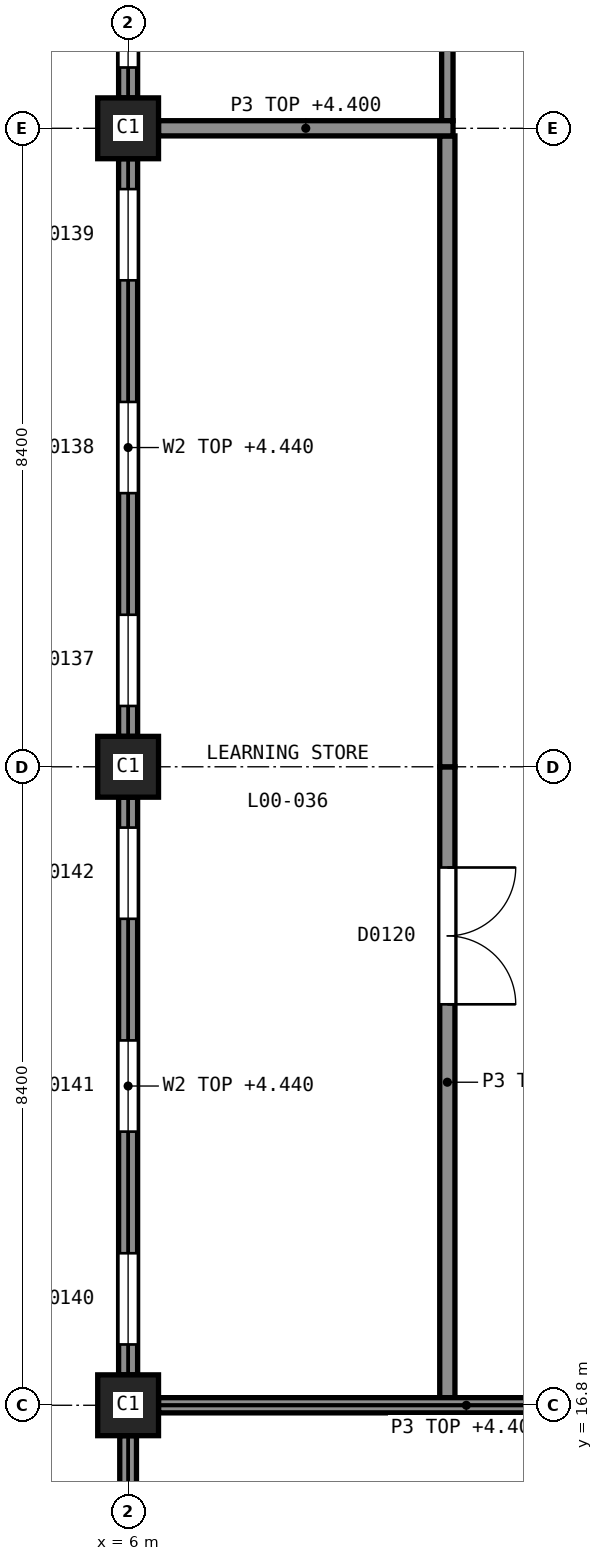
"""IFC4 building model, lengths in metres.
Left out: names, types, materials, properties, quantities, classifications, styles, units other than length and angle.
Written with IfcOpenShell. Run it as: python <this file> out.ifc"""

import sys

from ifc_helpers import new_model, si_unit, direction, frame, frame_2d, origin, origin_2d, place, context, subcontext, project, spatial, rectangle, extrude, element, fill, save


model = new_model("IFC4")
c1 = context("Model", 3, precision=1e-05, world=origin(), true_north=direction((0.0, 1.0)))
c2 = subcontext(c1, "Body", "Model", "MODEL_VIEW")
j1 = project(units=[si_unit("LENGTHUNIT", "METRE"), si_unit("PLANEANGLEUNIT", "RADIAN")], contexts=[c1])
p1 = place(None, origin())
s1 = spatial("IfcSite", under=j1, at=p1, CompositionType="ELEMENT")
p2 = place(p1, origin())
s2 = spatial("IfcBuilding", under=s1, at=p2, CompositionType="ELEMENT")
p3 = place(p2, origin())
s3 = spatial("IfcBuildingStorey", under=s2, at=p3, CompositionType="ELEMENT", Elevation=0.0)
for number, where, z_axis, x_axis in (
    (1, (6.0, 16.8, -0.3), (0.0, 0.0, 1.0), (1.0, 0.0, 0.0)),
    (2, (6.0, 25.2, -0.3), (0.0, 0.0, 1.0), (1.0, 0.0, 0.0)),
    (3, (6.0, 33.6, -0.3), (0.0, 0.0, 1.0), (1.0, 0.0, 0.0)),
):
    element("IfcColumn", number, at=place(p3, frame(where, z_axis=z_axis, x_axis=x_axis)), inside=s3, PredefinedType="COLUMN", context=c2, shape_type="SweptSolid", body=[
        extrude(rectangle(XDim=0.8, YDim=0.8, at=origin_2d()), origin(), (0.0, 0.0, 1.0), 5.8),
    ])
p4 = place(p3, frame((6.0, 34.0, 0.0), z_axis=(0.0, 0.0, 1.0), x_axis=(0.0, 1.0, 0.0)))
e4 = element("IfcWall", 4, at=p4, inside=s3, PredefinedType="SOLIDWALL", context=c2, shape_type="SweptSolid", body=[
    extrude(rectangle(XDim=7.6, YDim=0.25, at=frame_2d((3.8, 0.0))), origin(), (0.0, 0.0, 1.0), 4.44),
])
p5 = place(p4, frame((0.4, 0.0, 0.9)))
e5 = element("IfcOpeningElement", 5, at=p5, cuts=e4, PredefinedType="OPENING", context=c2, shape_type="SweptSolid", body=[
    extrude(rectangle(XDim=1.2, YDim=2.1, at=frame_2d((0.6, 1.05))), frame((0.0, 0.135, 0.0), z_axis=(0.0, -1.0, 0.0), x_axis=(1.0, 0.0, 0.0)), (0.0, 0.0, 1.0), 0.27),
])
p6 = place(p4, frame((3.2, 0.0, 0.9)))
e6 = element("IfcOpeningElement", 6, at=p6, cuts=e4, PredefinedType="OPENING", context=c2, shape_type="SweptSolid", body=[
    extrude(rectangle(XDim=1.2, YDim=2.1, at=frame_2d((0.6, 1.05))), frame((0.0, 0.135, 0.0), z_axis=(0.0, -1.0, 0.0), x_axis=(1.0, 0.0, 0.0)), (0.0, 0.0, 1.0), 0.27),
])
p7 = place(p4, frame((6.0, 0.0, 0.9)))
e7 = element("IfcOpeningElement", 7, at=p7, cuts=e4, PredefinedType="OPENING", context=c2, shape_type="SweptSolid", body=[
    extrude(rectangle(XDim=1.2, YDim=2.1, at=frame_2d((0.6, 1.05))), frame((0.0, 0.135, 0.0), z_axis=(0.0, -1.0, 0.0), x_axis=(1.0, 0.0, 0.0)), (0.0, 0.0, 1.0), 0.27),
])
p8 = place(p3, frame((6.0, 25.6, 0.0), z_axis=(0.0, 0.0, 1.0), x_axis=(0.0, 1.0, 0.0)))
e8 = element("IfcWall", 8, at=p8, inside=s3, PredefinedType="SOLIDWALL", context=c2, shape_type="SweptSolid", body=[
    extrude(rectangle(XDim=7.6, YDim=0.25, at=frame_2d((3.8, 0.0))), origin(), (0.0, 0.0, 1.0), 4.44),
])
p9 = place(p8, frame((0.4, 0.0, 0.9)))
e9 = element("IfcOpeningElement", 9, at=p9, cuts=e8, PredefinedType="OPENING", context=c2, shape_type="SweptSolid", body=[
    extrude(rectangle(XDim=1.2, YDim=2.1, at=frame_2d((0.6, 1.05))), frame((0.0, 0.135, 0.0), z_axis=(0.0, -1.0, 0.0), x_axis=(1.0, 0.0, 0.0)), (0.0, 0.0, 1.0), 0.27),
])
p10 = place(p8, frame((3.2, 0.0, 0.9)))
e10 = element("IfcOpeningElement", 10, at=p10, cuts=e8, PredefinedType="OPENING", context=c2, shape_type="SweptSolid", body=[
    extrude(rectangle(XDim=1.2, YDim=2.1, at=frame_2d((0.6, 1.05))), frame((0.0, 0.135, 0.0), z_axis=(0.0, -1.0, 0.0), x_axis=(1.0, 0.0, 0.0)), (0.0, 0.0, 1.0), 0.27),
])
p11 = place(p8, frame((6.0, 0.0, 0.9)))
e11 = element("IfcOpeningElement", 11, at=p11, cuts=e8, PredefinedType="OPENING", context=c2, shape_type="SweptSolid", body=[
    extrude(rectangle(XDim=1.2, YDim=2.1, at=frame_2d((0.6, 1.05))), frame((0.0, 0.135, 0.0), z_axis=(0.0, -1.0, 0.0), x_axis=(1.0, 0.0, 0.0)), (0.0, 0.0, 1.0), 0.27),
])
p12 = place(p3, frame((6.0, 17.2, 0.0), z_axis=(0.0, 0.0, 1.0), x_axis=(0.0, 1.0, 0.0)))
e12 = element("IfcWall", 12, at=p12, inside=s3, PredefinedType="SOLIDWALL", context=c2, shape_type="SweptSolid", body=[
    extrude(rectangle(XDim=7.6, YDim=0.25, at=frame_2d((3.8, 0.0))), origin(), (0.0, 0.0, 1.0), 4.44),
])
p13 = place(p12, frame((0.4, 0.0, 0.9)))
e13 = element("IfcOpeningElement", 13, at=p13, cuts=e12, PredefinedType="OPENING", context=c2, shape_type="SweptSolid", body=[
    extrude(rectangle(XDim=1.2, YDim=2.1, at=frame_2d((0.6, 1.05))), frame((0.0, 0.135, 0.0), z_axis=(0.0, -1.0, 0.0), x_axis=(1.0, 0.0, 0.0)), (0.0, 0.0, 1.0), 0.27),
])
p14 = place(p12, frame((3.2, 0.0, 0.9)))
e14 = element("IfcOpeningElement", 14, at=p14, cuts=e12, PredefinedType="OPENING", context=c2, shape_type="SweptSolid", body=[
    extrude(rectangle(XDim=1.2, YDim=2.1, at=frame_2d((0.6, 1.05))), frame((0.0, 0.135, 0.0), z_axis=(0.0, -1.0, 0.0), x_axis=(1.0, 0.0, 0.0)), (0.0, 0.0, 1.0), 0.27),
])
p15 = place(p12, frame((6.0, 0.0, 0.9)))
e15 = element("IfcOpeningElement", 15, at=p15, cuts=e12, PredefinedType="OPENING", context=c2, shape_type="SweptSolid", body=[
    extrude(rectangle(XDim=1.2, YDim=2.1, at=frame_2d((0.6, 1.05))), frame((0.0, 0.135, 0.0), z_axis=(0.0, -1.0, 0.0), x_axis=(1.0, 0.0, 0.0)), (0.0, 0.0, 1.0), 0.27),
])
p16 = place(p3, frame((6.0, 8.4, 0.0), z_axis=(0.0, 0.0, 1.0), x_axis=(0.0, 1.0, 0.0)))
e16 = element("IfcWall", 16, at=p16, inside=s3, PredefinedType="SOLIDWALL", context=c2, shape_type="SweptSolid", body=[
    extrude(rectangle(XDim=8.0, YDim=0.22, at=frame_2d((4.0, 0.0))), origin(), (0.0, 0.0, 1.0), 4.44),
])
p17 = place(p16, frame((2.85, 0.0, 2.1)))
e17 = element("IfcOpeningElement", 17, at=p17, cuts=e16, PredefinedType="OPENING", context=c2, shape_type="SweptSolid", body=[
    extrude(rectangle(XDim=1.2, YDim=0.6, at=frame_2d((0.6, 0.3))), frame((0.0, 0.12, 0.0), z_axis=(0.0, -1.0, 0.0), x_axis=(1.0, 0.0, 0.0)), (0.0, 0.0, 1.0), 0.24),
])
p18 = place(p3, frame((10.2, 33.7, 0.0), z_axis=(0.0, 0.0, 1.0), x_axis=(0.0, 1.0, 0.0)))
e18 = element("IfcWall", 18, at=p18, inside=s3, PredefinedType="PARTITIONING", context=c2, shape_type="SweptSolid", body=[
    extrude(rectangle(XDim=8.3, YDim=0.15, at=frame_2d((4.15, 0.0))), origin(), (0.0, 0.0, 1.0), 4.4),
])
p19 = place(p18, frame((5.625, 0.0, 0.0)))
e19 = element("IfcOpeningElement", 19, at=p19, cuts=e18, PredefinedType="OPENING", context=c2, shape_type="SweptSolid", body=[
    extrude(rectangle(XDim=0.9, YDim=2.1, at=frame_2d((0.45, 1.05))), frame((0.0, 0.085, 0.0), z_axis=(0.0, -1.0, 0.0), x_axis=(1.0, 0.0, 0.0)), (0.0, 0.0, 1.0), 0.17),
])
p20 = place(p3, frame((10.2, 16.9, 0.0), z_axis=(0.0, 0.0, 1.0), x_axis=(0.0, 1.0, 0.0)))
e20 = element("IfcWall", 20, at=p20, inside=s3, PredefinedType="PARTITIONING", context=c2, shape_type="SweptSolid", body=[
    extrude(rectangle(XDim=8.3, YDim=0.2, at=frame_2d((4.15, 0.0))), origin(), (0.0, 0.0, 1.0), 4.4),
])
p21 = place(p20, frame((5.175, 0.0, 0.0)))
e21 = element("IfcOpeningElement", 21, at=p21, cuts=e20, PredefinedType="OPENING", context=c2, shape_type="SweptSolid", body=[
    extrude(rectangle(XDim=1.8, YDim=2.1, at=frame_2d((0.9, 1.05))), frame((0.0, 0.11, 0.0), z_axis=(0.0, -1.0, 0.0), x_axis=(1.0, 0.0, 0.0)), (0.0, 0.0, 1.0), 0.22),
])
p22 = place(p3, frame((10.2, 25.2, 0.0), z_axis=(0.0, 0.0, 1.0), x_axis=(0.0, 1.0, 0.0)))
e22 = element("IfcWall", 22, at=p22, inside=s3, PredefinedType="PARTITIONING", context=c2, shape_type="SweptSolid", body=[
    extrude(rectangle(XDim=8.3, YDim=0.2, at=frame_2d((4.15, 0.0))), origin(), (0.0, 0.0, 1.0), 4.4),
])
p23 = place(p3, frame((6.4, 33.6, 0.0), z_axis=(0.0, 0.0, 1.0), x_axis=(1.0, 0.0, 0.0)))
e23 = element("IfcWall", 23, at=p23, inside=s3, PredefinedType="PARTITIONING", context=c2, shape_type="SweptSolid", body=[
    extrude(rectangle(XDim=3.875, YDim=0.2, at=frame_2d((1.938, 0.0))), origin(), (0.0, 0.0, 1.0), 4.4),
])
p24 = place(p3, frame((6.4, 16.8, 0.0), z_axis=(0.0, 0.0, 1.0), x_axis=(1.0, 0.0, 0.0)))
e24 = element("IfcWall", 24, at=p24, inside=s3, PredefinedType="PARTITIONING", context=c2, shape_type="SweptSolid", body=[
    extrude(rectangle(XDim=8.1, YDim=0.2, at=frame_2d((4.05, 0.0))), origin(), (0.0, 0.0, 1.0), 4.4),
])
p25 = place(p24, frame((5.4, 0.0, 0.0)))
e25 = element("IfcOpeningElement", 25, at=p25, cuts=e24, PredefinedType="OPENING", context=c2, shape_type="SweptSolid", body=[
    extrude(rectangle(XDim=1.0, YDim=2.1, at=frame_2d((0.5, 1.05))), frame((0.0, 0.11, 0.0), z_axis=(0.0, -1.0, 0.0), x_axis=(1.0, 0.0, 0.0)), (0.0, 0.0, 1.0), 0.22),
])
p26 = place(p5, origin())
e26 = element("IfcWindow", 26, at=p26, inside=s3, PartitioningType="SINGLE_PANEL", PredefinedType="WINDOW", context=c2, shape_type="SweptSolid", body=[
    extrude(rectangle(XDim=1.2, YDim=2.1, at=frame_2d((0.6, 1.05))), frame((0.0, -0.045, 0.0), z_axis=(0.0, -1.0, 0.0), x_axis=(1.0, 0.0, 0.0)), (0.0, 0.0, 1.0), 0.06),
])
fill(e5, e26)
p27 = place(p9, origin())
e27 = element("IfcWindow", 27, at=p27, inside=s3, PartitioningType="SINGLE_PANEL", PredefinedType="WINDOW", context=c2, shape_type="SweptSolid", body=[
    extrude(rectangle(XDim=1.2, YDim=2.1, at=frame_2d((0.6, 1.05))), frame((0.0, -0.045, 0.0), z_axis=(0.0, -1.0, 0.0), x_axis=(1.0, 0.0, 0.0)), (0.0, 0.0, 1.0), 0.06),
])
fill(e9, e27)
p28 = place(p10, origin())
e28 = element("IfcWindow", 28, at=p28, inside=s3, PartitioningType="SINGLE_PANEL", PredefinedType="WINDOW", context=c2, shape_type="SweptSolid", body=[
    extrude(rectangle(XDim=1.2, YDim=2.1, at=frame_2d((0.6, 1.05))), frame((0.0, -0.045, 0.0), z_axis=(0.0, -1.0, 0.0), x_axis=(1.0, 0.0, 0.0)), (0.0, 0.0, 1.0), 0.06),
])
fill(e10, e28)
p29 = place(p11, origin())
e29 = element("IfcWindow", 29, at=p29, inside=s3, PartitioningType="SINGLE_PANEL", PredefinedType="WINDOW", context=c2, shape_type="SweptSolid", body=[
    extrude(rectangle(XDim=1.2, YDim=2.1, at=frame_2d((0.6, 1.05))), frame((0.0, -0.045, 0.0), z_axis=(0.0, -1.0, 0.0), x_axis=(1.0, 0.0, 0.0)), (0.0, 0.0, 1.0), 0.06),
])
fill(e11, e29)
p30 = place(p13, origin())
e30 = element("IfcWindow", 30, at=p30, inside=s3, PartitioningType="SINGLE_PANEL", PredefinedType="WINDOW", context=c2, shape_type="SweptSolid", body=[
    extrude(rectangle(XDim=1.2, YDim=2.1, at=frame_2d((0.6, 1.05))), frame((0.0, -0.045, 0.0), z_axis=(0.0, -1.0, 0.0), x_axis=(1.0, 0.0, 0.0)), (0.0, 0.0, 1.0), 0.06),
])
fill(e13, e30)
p31 = place(p14, origin())
e31 = element("IfcWindow", 31, at=p31, inside=s3, PartitioningType="SINGLE_PANEL", PredefinedType="WINDOW", context=c2, shape_type="SweptSolid", body=[
    extrude(rectangle(XDim=1.2, YDim=2.1, at=frame_2d((0.6, 1.05))), frame((0.0, -0.045, 0.0), z_axis=(0.0, -1.0, 0.0), x_axis=(1.0, 0.0, 0.0)), (0.0, 0.0, 1.0), 0.06),
])
fill(e14, e31)
p32 = place(p15, origin())
e32 = element("IfcWindow", 32, at=p32, inside=s3, PartitioningType="SINGLE_PANEL", PredefinedType="WINDOW", context=c2, shape_type="SweptSolid", body=[
    extrude(rectangle(XDim=1.2, YDim=2.1, at=frame_2d((0.6, 1.05))), frame((0.0, -0.045, 0.0), z_axis=(0.0, -1.0, 0.0), x_axis=(1.0, 0.0, 0.0)), (0.0, 0.0, 1.0), 0.06),
])
fill(e15, e32)
p33 = place(p21, origin())
e33 = element("IfcDoor", 33, at=p33, inside=s3, OperationType="DOUBLE_DOOR_SINGLE_SWING", PredefinedType="DOOR", context=c2, shape_type="SweptSolid", body=[
    extrude(rectangle(XDim=1.8, YDim=2.1, at=frame_2d((0.9, 1.05))), frame((0.0, 0.025, 0.0), z_axis=(0.0, -1.0, 0.0), x_axis=(1.0, 0.0, 0.0)), (0.0, 0.0, 1.0), 0.05),
])
fill(e21, e33)
save(model, sys.argv[1])
